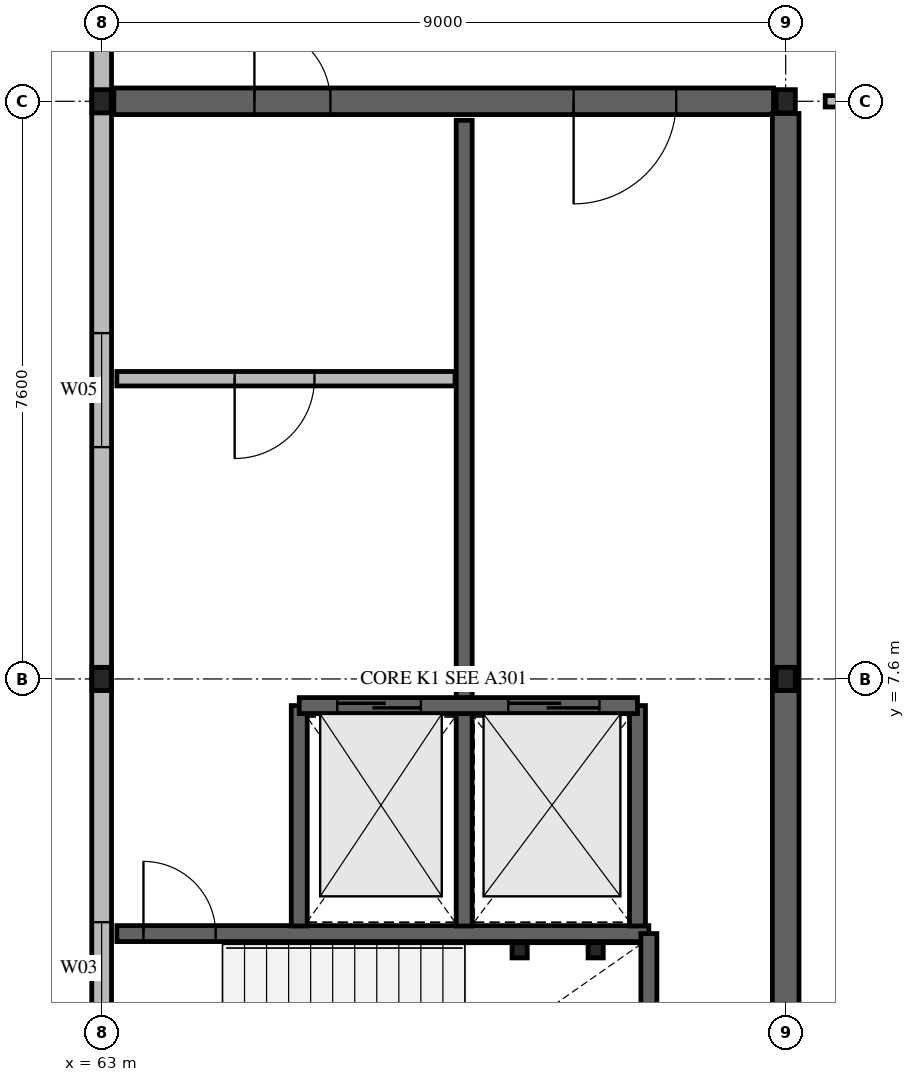
"""IFC4 building model, lengths in metres.
Left out: names, types, materials, properties, quantities, classifications, styles, units other than length and angle.
Written with IfcOpenShell. Run it as: python <this file> out.ifc"""

import sys

from ifc_helpers import new_model, si_unit, direction, frame, frame_2d, origin, origin_2d, place, context, subcontext, project, spatial, rectangle, hollow_rectangle, i_section, extrude, element, fill, save


model = new_model("IFC4")
c1 = context("Model", 3, precision=1e-05, world=origin(), true_north=direction((0.0, 1.0)))
c2 = subcontext(c1, "Body", "Model", "MODEL_VIEW")
j1 = project(units=[si_unit("LENGTHUNIT", "METRE"), si_unit("PLANEANGLEUNIT", "RADIAN")], contexts=[c1])
p1 = place(None, origin())
s1 = spatial("IfcSite", under=j1, at=p1, CompositionType="ELEMENT")
p2 = place(p1, origin())
s2 = spatial("IfcBuilding", under=s1, at=p2, CompositionType="ELEMENT")
p3 = place(p2, frame((0.0, 0.0, 22.32)))
s3 = spatial("IfcBuildingStorey", under=s2, at=p3, CompositionType="ELEMENT", Elevation=22.32)
for number, where, z_axis, x_axis in (
    (1, (63.0, 7.6, 0.0), (0.0, 0.0, 1.0), (1.0, 0.0, 0.0)),
    (2, (63.0, 15.2, 0.0), (0.0, 0.0, 1.0), (1.0, 0.0, 0.0)),
    (3, (72.0, 7.6, 0.0), (0.0, 0.0, 1.0), (1.0, 0.0, 0.0)),
    (4, (72.0, 15.2, 0.0), (0.0, 0.0, 1.0), (1.0, 0.0, 0.0)),
):
    element("IfcColumn", number, at=place(p3, frame(where, z_axis=z_axis, x_axis=x_axis)), inside=s3, PredefinedType="COLUMN", context=c2, shape_type="SweptSolid", body=[
        extrude(i_section(OverallWidth=0.254, OverallDepth=0.306, WebThickness=0.009, FlangeThickness=0.015, FilletRadius=0.015, at=origin_2d()), origin(), (0.0, 0.0, 1.0), 4.32),
    ])
p4 = place(p3, frame((63.0, 0.0, 0.0), z_axis=(0.0, 0.0, 1.0), x_axis=(0.0, 1.0, 0.0)))
e5 = element("IfcWall", 5, at=p4, inside=s3, PredefinedType="STANDARD", context=c2, shape_type="SweptSolid", body=[
    extrude(rectangle(XDim=7.6, YDim=0.26, at=frame_2d((3.8, 0.0))), origin(), (0.0, 0.0, 1.0), 3.559),
])
p5 = place(p4, frame((3.2, 0.0, 0.85)))
e6 = element("IfcOpeningElement", 6, at=p5, cuts=e5, PredefinedType="OPENING", context=c2, shape_type="SweptSolid", body=[
    extrude(rectangle(XDim=1.2, YDim=1.2, at=frame_2d((0.6, 0.6))), frame((0.0, 0.14, 0.0), z_axis=(0.0, -1.0, 0.0), x_axis=(1.0, 0.0, 0.0)), (0.0, 0.0, 1.0), 0.28),
])
p6 = place(p3, frame((63.0, 7.6, 0.0), z_axis=(0.0, 0.0, 1.0), x_axis=(0.0, 1.0, 0.0)))
e7 = element("IfcWall", 7, at=p6, inside=s3, PredefinedType="STANDARD", context=c2, shape_type="SweptSolid", body=[
    extrude(rectangle(XDim=7.6, YDim=0.26, at=frame_2d((3.8, 0.0))), origin(), (0.0, 0.0, 1.0), 3.559),
])
p7 = place(p6, frame((3.05, 0.0, 0.85)))
e8 = element("IfcOpeningElement", 8, at=p7, cuts=e7, PredefinedType="OPENING", context=c2, shape_type="SweptSolid", body=[
    extrude(rectangle(XDim=1.5, YDim=1.2, at=frame_2d((0.75, 0.6))), frame((0.0, 0.14, 0.0), z_axis=(0.0, -1.0, 0.0), x_axis=(1.0, 0.0, 0.0)), (0.0, 0.0, 1.0), 0.28),
])
p8 = place(p3, frame((63.0, 15.2, 0.0), z_axis=(0.0, 0.0, 1.0), x_axis=(0.0, 1.0, 0.0)))
e9 = element("IfcWall", 9, at=p8, inside=s3, PredefinedType="STANDARD", context=c2, shape_type="SweptSolid", body=[
    extrude(rectangle(XDim=7.81, YDim=0.26, at=frame_2d((3.905, 0.0))), origin(), (0.0, 0.0, 1.0), 3.559),
])
p9 = place(p8, frame((2.9, 0.0, 0.85)))
e10 = element("IfcOpeningElement", 10, at=p9, cuts=e9, PredefinedType="OPENING", context=c2, shape_type="SweptSolid", body=[
    extrude(rectangle(XDim=1.8, YDim=1.2, at=frame_2d((0.9, 0.6))), frame((0.0, 0.14, 0.0), z_axis=(0.0, -1.0, 0.0), x_axis=(1.0, 0.0, 0.0)), (0.0, 0.0, 1.0), 0.28),
])
p10 = place(p3, frame((63.16, 15.2, 0.0), z_axis=(0.0, 0.0, 1.0), x_axis=(1.0, 0.0, 0.0)))
e11 = element("IfcWall", 11, at=p10, inside=s3, PredefinedType="SHEAR", context=c2, shape_type="SweptSolid", body=[
    extrude(rectangle(XDim=8.68, YDim=0.35, at=frame_2d((4.34, 0.0))), origin(), (0.0, 0.0, 1.0), 4.04),
])
p11 = place(p10, frame((1.85, 0.0, 0.0)))
e12 = element("IfcOpeningElement", 12, at=p11, cuts=e11, PredefinedType="OPENING", context=c2, shape_type="SweptSolid", body=[
    extrude(rectangle(XDim=1.0, YDim=2.15, at=frame_2d((0.5, 1.075))), frame((0.0, 0.185, 0.0), z_axis=(0.0, -1.0, 0.0), x_axis=(1.0, 0.0, 0.0)), (0.0, 0.0, 1.0), 0.37),
])
p12 = place(p10, frame((6.05, 0.0, 0.0)))
e13 = element("IfcOpeningElement", 13, at=p12, cuts=e11, PredefinedType="OPENING", context=c2, shape_type="SweptSolid", body=[
    extrude(rectangle(XDim=1.35, YDim=2.18, at=frame_2d((0.675, 1.09))), frame((0.0, 0.185, 0.0), z_axis=(0.0, -1.0, 0.0), x_axis=(1.0, 0.0, 0.0)), (0.0, 0.0, 1.0), 0.37),
])
p13 = place(p3, frame((72.0, 0.16, 0.0), z_axis=(0.0, 0.0, 1.0), x_axis=(0.0, 1.0, 0.0)))
e14 = element("IfcWall", 14, at=p13, inside=s3, PredefinedType="SHEAR", context=c2, shape_type="SweptSolid", body=[
    extrude(rectangle(XDim=14.88, YDim=0.35, at=frame_2d((7.44, 0.0))), origin(), (0.0, 0.0, 1.0), 4.04),
])
p14 = place(p3, frame((63.2, 4.25, 0.0), z_axis=(0.0, 0.0, 1.0), x_axis=(1.0, 0.0, 0.0)))
e15 = element("IfcWall", 15, at=p14, inside=s3, PredefinedType="SOLIDWALL", context=c2, shape_type="SweptSolid", body=[
    extrude(rectangle(XDim=7.0, YDim=0.21, at=frame_2d((3.5, 0.0))), origin(), (0.0, 0.0, 1.0), 4.04),
])
p15 = place(p14, frame((0.35, 0.0, 0.0)))
e16 = element("IfcOpeningElement", 16, at=p15, cuts=e15, PredefinedType="OPENING", context=c2, shape_type="SweptSolid", body=[
    extrude(rectangle(XDim=0.95, YDim=2.12, at=frame_2d((0.475, 1.06))), frame((0.0, 0.115, 0.0), z_axis=(0.0, -1.0, 0.0), x_axis=(1.0, 0.0, 0.0)), (0.0, 0.0, 1.0), 0.23),
])
p16 = place(p3, frame((70.2, 0.2, 0.0), z_axis=(0.0, 0.0, 1.0), x_axis=(0.0, 1.0, 0.0)))
e17 = element("IfcWall", 17, at=p16, inside=s3, PredefinedType="SOLIDWALL", context=c2, shape_type="SweptSolid", body=[
    extrude(rectangle(XDim=4.05, YDim=0.21, at=frame_2d((2.025, 0.0))), origin(), (0.0, 0.0, 1.0), 4.04),
])
p17 = place(p3, frame((65.6, 4.35, 0.0), z_axis=(0.0, 0.0, 1.0), x_axis=(0.0, 1.0, 0.0)))
e18 = element("IfcWall", 18, at=p17, inside=s3, PredefinedType="SOLIDWALL", context=c2, shape_type="SweptSolid", body=[
    extrude(rectangle(XDim=2.9, YDim=0.21, at=frame_2d((1.45, 0.0))), origin(), (0.0, 0.0, 1.0), 4.04),
])
p18 = place(p3, frame((67.77, 4.35, 0.0), z_axis=(0.0, 0.0, 1.0), x_axis=(0.0, 1.0, 0.0)))
e19 = element("IfcWall", 19, at=p18, inside=s3, PredefinedType="SOLIDWALL", context=c2, shape_type="SweptSolid", body=[
    extrude(rectangle(XDim=10.6, YDim=0.21, at=frame_2d((5.3, 0.0))), origin(), (0.0, 0.0, 1.0), 4.04),
])
p19 = place(p3, frame((70.05, 4.35, 0.0), z_axis=(0.0, 0.0, 1.0), x_axis=(0.0, 1.0, 0.0)))
e20 = element("IfcWall", 20, at=p19, inside=s3, PredefinedType="SOLIDWALL", context=c2, shape_type="SweptSolid", body=[
    extrude(rectangle(XDim=2.9, YDim=0.21, at=frame_2d((1.45, 0.0))), origin(), (0.0, 0.0, 1.0), 4.04),
])
p20 = place(p3, frame((65.6, 7.25, 0.0), z_axis=(0.0, 0.0, 1.0), x_axis=(1.0, 0.0, 0.0)))
e21 = element("IfcWall", 21, at=p20, inside=s3, PredefinedType="SOLIDWALL", context=c2, shape_type="SweptSolid", body=[
    extrude(rectangle(XDim=4.45, YDim=0.21, at=frame_2d((2.225, 0.0))), origin(), (0.0, 0.0, 1.0), 4.04),
])
p21 = place(p20, frame((0.5, 0.0, 0.0)))
e22 = element("IfcOpeningElement", 22, at=p21, cuts=e21, PredefinedType="OPENING", context=c2, shape_type="SweptSolid", body=[
    extrude(rectangle(XDim=1.1, YDim=2.14, at=frame_2d((0.55, 1.07))), frame((0.0, 0.115, 0.0), z_axis=(0.0, -1.0, 0.0), x_axis=(1.0, 0.0, 0.0)), (0.0, 0.0, 1.0), 0.23),
])
p22 = place(p20, frame((2.75, 0.0, 0.0)))
e23 = element("IfcOpeningElement", 23, at=p22, cuts=e21, PredefinedType="OPENING", context=c2, shape_type="SweptSolid", body=[
    extrude(rectangle(XDim=1.2, YDim=2.18, at=frame_2d((0.6, 1.09))), frame((0.0, 0.115, 0.0), z_axis=(0.0, -1.0, 0.0), x_axis=(1.0, 0.0, 0.0)), (0.0, 0.0, 1.0), 0.23),
])
p23 = place(p3, frame((63.2, 11.55, 0.0), z_axis=(0.0, 0.0, 1.0), x_axis=(1.0, 0.0, 0.0)))
e24 = element("IfcWall", 24, at=p23, inside=s3, PredefinedType="SOLIDWALL", context=c2, shape_type="SweptSolid", body=[
    extrude(rectangle(XDim=4.45, YDim=0.19, at=frame_2d((2.225, 0.0))), origin(), (0.0, 0.0, 1.0), 4.04),
])
p24 = place(p23, frame((1.55, 0.0, 0.0)))
e25 = element("IfcOpeningElement", 25, at=p24, cuts=e24, PredefinedType="OPENING", context=c2, shape_type="SweptSolid", body=[
    extrude(rectangle(XDim=1.05, YDim=2.12, at=frame_2d((0.525, 1.06))), frame((0.0, 0.105, 0.0), z_axis=(0.0, -1.0, 0.0), x_axis=(1.0, 0.0, 0.0)), (0.0, 0.0, 1.0), 0.21),
])
for number, where, z_axis, x_axis in (
    (26, (68.5, 4.03, 0.0), (0.0, 0.0, 1.0), (1.0, 0.0, 0.0)),
    (27, (69.5, 4.03, 0.0), (0.0, 0.0, 1.0), (1.0, 0.0, 0.0)),
):
    element("IfcColumn", number, at=place(p3, frame(where, z_axis=z_axis, x_axis=x_axis)), inside=s3, PredefinedType="COLUMN", context=c2, shape_type="SweptSolid", body=[
        extrude(hollow_rectangle(XDim=0.2, YDim=0.2, WallThickness=0.012, at=origin_2d()), origin(), (0.0, 0.0, 1.0), 1.97),
    ])
p25 = place(p3, frame((72.52, 15.2, 0.0), z_axis=(0.0, 0.0, 1.0), x_axis=(1.0, 0.0, 0.0)))
e28 = element("IfcWall", 28, at=p25, inside=s3, PredefinedType="PARTITIONING", context=c2, shape_type="SweptSolid", body=[
    extrude(rectangle(XDim=8.36, YDim=0.15, at=frame_2d((4.18, 0.0))), origin(), (0.0, 0.0, 1.0), 3.484),
])
p26 = place(p25, frame((3.36, 0.0, 0.0)))
e29 = element("IfcOpeningElement", 29, at=p26, cuts=e28, PredefinedType="OPENING", context=c2, shape_type="SweptSolid", body=[
    extrude(rectangle(XDim=1.0, YDim=2.15, at=frame_2d((0.5, 1.075))), frame((0.0, 0.085, 0.0), z_axis=(0.0, -1.0, 0.0), x_axis=(1.0, 0.0, 0.0)), (0.0, 0.0, 1.0), 0.17),
])
p27 = place(p5, origin())
e30 = element("IfcWindow", 30, at=p27, inside=s3, PartitioningType="SINGLE_PANEL", PredefinedType="WINDOW", context=c2, shape_type="SweptSolid", body=[
    extrude(rectangle(XDim=1.2, YDim=1.2, at=frame_2d((0.6, 0.6))), frame((0.0, 0.03, 0.0), z_axis=(0.0, -1.0, 0.0), x_axis=(1.0, 0.0, 0.0)), (0.0, 0.0, 1.0), 0.06),
])
fill(e6, e30)
p28 = place(p7, origin())
e31 = element("IfcWindow", 31, at=p28, inside=s3, PartitioningType="SINGLE_PANEL", PredefinedType="WINDOW", context=c2, shape_type="SweptSolid", body=[
    extrude(rectangle(XDim=1.5, YDim=1.2, at=frame_2d((0.75, 0.6))), frame((0.0, 0.03, 0.0), z_axis=(0.0, -1.0, 0.0), x_axis=(1.0, 0.0, 0.0)), (0.0, 0.0, 1.0), 0.06),
])
fill(e8, e31)
p29 = place(p15, origin())
e32 = element("IfcDoor", 32, at=p29, inside=s3, OperationType="SINGLE_SWING_LEFT", PredefinedType="DOOR", context=c2, shape_type="SweptSolid", body=[
    extrude(rectangle(XDim=0.95, YDim=2.12, at=frame_2d((0.475, 1.06))), frame((0.0, 0.025, 0.0), z_axis=(0.0, -1.0, 0.0), x_axis=(1.0, 0.0, 0.0)), (0.0, 0.0, 1.0), 0.05),
])
fill(e16, e32)
p30 = place(p21, origin())
e33 = element("IfcDoor", 33, at=p30, inside=s3, OperationType="SLIDING_TO_LEFT", PredefinedType="DOOR", context=c2, shape_type="SweptSolid", body=[
    extrude(rectangle(XDim=1.1, YDim=2.14, at=frame_2d((0.55, 1.07))), frame((0.0, 0.025, 0.0), z_axis=(0.0, -1.0, 0.0), x_axis=(1.0, 0.0, 0.0)), (0.0, 0.0, 1.0), 0.05),
])
fill(e22, e33)
p31 = place(p22, origin())
e34 = element("IfcDoor", 34, at=p31, inside=s3, OperationType="SLIDING_TO_LEFT", PredefinedType="DOOR", context=c2, shape_type="SweptSolid", body=[
    extrude(rectangle(XDim=1.2, YDim=2.18, at=frame_2d((0.6, 1.09))), frame((0.0, 0.025, 0.0), z_axis=(0.0, -1.0, 0.0), x_axis=(1.0, 0.0, 0.0)), (0.0, 0.0, 1.0), 0.05),
])
fill(e23, e34)
p32 = place(p24, origin())
e35 = element("IfcDoor", 35, at=p32, inside=s3, OperationType="SINGLE_SWING_RIGHT", PredefinedType="DOOR", context=c2, shape_type="SweptSolid", body=[
    extrude(rectangle(XDim=1.05, YDim=2.12, at=frame_2d((0.525, 1.06))), frame((0.0, 0.025, 0.0), z_axis=(0.0, -1.0, 0.0), x_axis=(1.0, 0.0, 0.0)), (0.0, 0.0, 1.0), 0.05),
])
fill(e25, e35)
p33 = place(p11, origin())
e36 = element("IfcDoor", 36, at=p33, inside=s3, OperationType="SINGLE_SWING_LEFT", PredefinedType="DOOR", context=c2, shape_type="SweptSolid", body=[
    extrude(rectangle(XDim=1.0, YDim=2.15, at=frame_2d((0.5, 1.075))), frame((0.0, 0.025, 0.0), z_axis=(0.0, -1.0, 0.0), x_axis=(1.0, 0.0, 0.0)), (0.0, 0.0, 1.0), 0.05),
])
fill(e12, e36)
p34 = place(p12, origin())
e37 = element("IfcDoor", 37, at=p34, inside=s3, OperationType="SINGLE_SWING_RIGHT", PredefinedType="DOOR", context=c2, shape_type="SweptSolid", body=[
    extrude(rectangle(XDim=1.35, YDim=2.18, at=frame_2d((0.675, 1.09))), frame((0.0, 0.025, 0.0), z_axis=(0.0, -1.0, 0.0), x_axis=(1.0, 0.0, 0.0)), (0.0, 0.0, 1.0), 0.05),
])
fill(e13, e37)
save(model, sys.argv[1])
